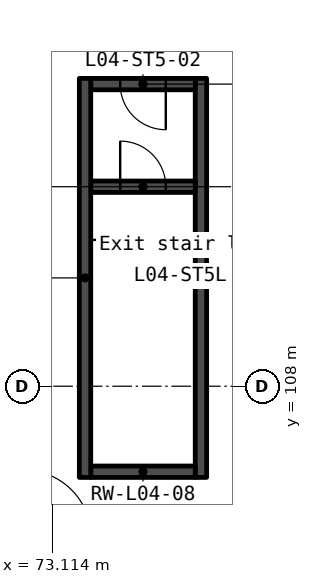
"""IFC4 building model, lengths in metres.
Left out: names, types, materials, properties, quantities, classifications, styles, units other than length and angle.
Written with IfcOpenShell. Run it as: python <this file> out.ifc"""

import sys

from ifc_helpers import new_model, si_unit, direction, frame, frame_2d, origin, place, context, subcontext, project, spatial, rectangle, extrude, element, fill, save


model = new_model("IFC4")
c1 = context("Model", 3, precision=1e-05, world=origin(), true_north=direction((0.0, 1.0)))
c2 = subcontext(c1, "Body", "Model", "MODEL_VIEW")
j1 = project(units=[si_unit("LENGTHUNIT", "METRE"), si_unit("PLANEANGLEUNIT", "RADIAN")], contexts=[c1])
p1 = place(None, origin())
s1 = spatial("IfcSite", under=j1, at=p1, CompositionType="ELEMENT")
p2 = place(p1, origin())
s2 = spatial("IfcBuilding", under=s1, at=p2, CompositionType="ELEMENT")
p3 = place(p2, frame((0.0, 0.0, 25.0)))
s3 = spatial("IfcBuildingStorey", under=s2, at=p3, CompositionType="ELEMENT", Elevation=25.0)
for number, where, z_axis, x_axis in (
    (1, (73.975, 105.6, 0.0), (0.0, 0.0, 1.0), (0.0, 1.0, 0.0)),
    (2, (77.025, 105.6, 0.0), (0.0, 0.0, 1.0), (0.0, 1.0, 0.0)),
):
    element("IfcWall", number, at=place(p3, frame(where, z_axis=z_axis, x_axis=x_axis)), inside=s3, PredefinedType="SOLIDWALL", context=c2, shape_type="SweptSolid", body=[
        extrude(rectangle(XDim=10.5, YDim=0.3, at=frame_2d((5.25, 0.0))), origin(), (0.0, 0.0, 1.0), 4.7),
    ])
p4 = place(p3, frame((74.125, 105.75, 0.0), z_axis=(0.0, 0.0, 1.0), x_axis=(1.0, 0.0, 0.0)))
e3 = element("IfcWall", 3, at=p4, inside=s3, PredefinedType="SOLIDWALL", context=c2, shape_type="SweptSolid", body=[
    extrude(rectangle(XDim=2.75, YDim=0.3, at=frame_2d((1.375, 0.0))), origin(), (0.0, 0.0, 1.0), 4.7),
])
p5 = place(p3, frame((74.125, 113.25, 0.0), z_axis=(0.0, 0.0, 1.0), x_axis=(1.0, 0.0, 0.0)))
e4 = element("IfcWall", 4, at=p5, inside=s3, PredefinedType="SOLIDWALL", context=c2, shape_type="SweptSolid", body=[
    extrude(rectangle(XDim=2.75, YDim=0.3, at=frame_2d((1.375, 0.0))), origin(), (0.0, 0.0, 1.0), 4.7),
])
p6 = place(p5, frame((0.775, 0.0, 0.0)))
e5 = element("IfcOpeningElement", 5, at=p6, cuts=e4, PredefinedType="OPENING", context=c2, shape_type="SweptSolid", body=[
    extrude(rectangle(XDim=1.2, YDim=2.1, at=frame_2d((0.6, 1.05))), frame((0.0, 0.16, 0.0), z_axis=(0.0, -1.0, 0.0), x_axis=(1.0, 0.0, 0.0)), (0.0, 0.0, 1.0), 0.32),
])
p7 = place(p3, frame((74.125, 115.95, 0.0), z_axis=(0.0, 0.0, 1.0), x_axis=(1.0, 0.0, 0.0)))
e6 = element("IfcWall", 6, at=p7, inside=s3, PredefinedType="SOLIDWALL", context=c2, shape_type="SweptSolid", body=[
    extrude(rectangle(XDim=2.75, YDim=0.3, at=frame_2d((1.375, 0.0))), origin(), (0.0, 0.0, 1.0), 4.7),
])
p8 = place(p7, frame((0.775, 0.0, 0.0)))
e7 = element("IfcOpeningElement", 7, at=p8, cuts=e6, PredefinedType="OPENING", context=c2, shape_type="SweptSolid", body=[
    extrude(rectangle(XDim=1.2, YDim=2.1, at=frame_2d((0.6, 1.05))), frame((0.0, 0.16, 0.0), z_axis=(0.0, -1.0, 0.0), x_axis=(1.0, 0.0, 0.0)), (0.0, 0.0, 1.0), 0.32),
])
p9 = place(p3, frame((77.166, 61.679, 0.0), z_axis=(0.0, 0.0, 1.0), x_axis=(-0.500000102728, 0.866025344474, 0.0)))
e8 = element("IfcWall", 8, at=p9, inside=s3, PredefinedType="STANDARD", context=c2, shape_type="SweptSolid", body=[
    extrude(rectangle(XDim=77.841, YDim=1.0, at=frame_2d((38.92, 0.0))), origin(), (0.0, 0.0, 1.0), 0.6),
])
p10 = place(p6, origin())
e9 = element("IfcDoor", 9, at=p10, inside=s3, OperationType="SINGLE_SWING_LEFT", PredefinedType="DOOR", context=c2, shape_type="SweptSolid", body=[
    extrude(rectangle(XDim=1.2, YDim=2.1, at=frame_2d((0.6, 1.05))), frame((0.0, 0.025, 0.0), z_axis=(0.0, -1.0, 0.0), x_axis=(1.0, 0.0, 0.0)), (0.0, 0.0, 1.0), 0.05),
])
fill(e5, e9)
p11 = place(p8, origin())
e10 = element("IfcDoor", 10, at=p11, inside=s3, OperationType="SINGLE_SWING_RIGHT", PredefinedType="DOOR", context=c2, shape_type="SweptSolid", body=[
    extrude(rectangle(XDim=1.2, YDim=2.1, at=frame_2d((0.6, 1.05))), frame((0.0, 0.025, 0.0), z_axis=(0.0, -1.0, 0.0), x_axis=(1.0, 0.0, 0.0)), (0.0, 0.0, 1.0), 0.05),
])
fill(e7, e10)
save(model, sys.argv[1])
